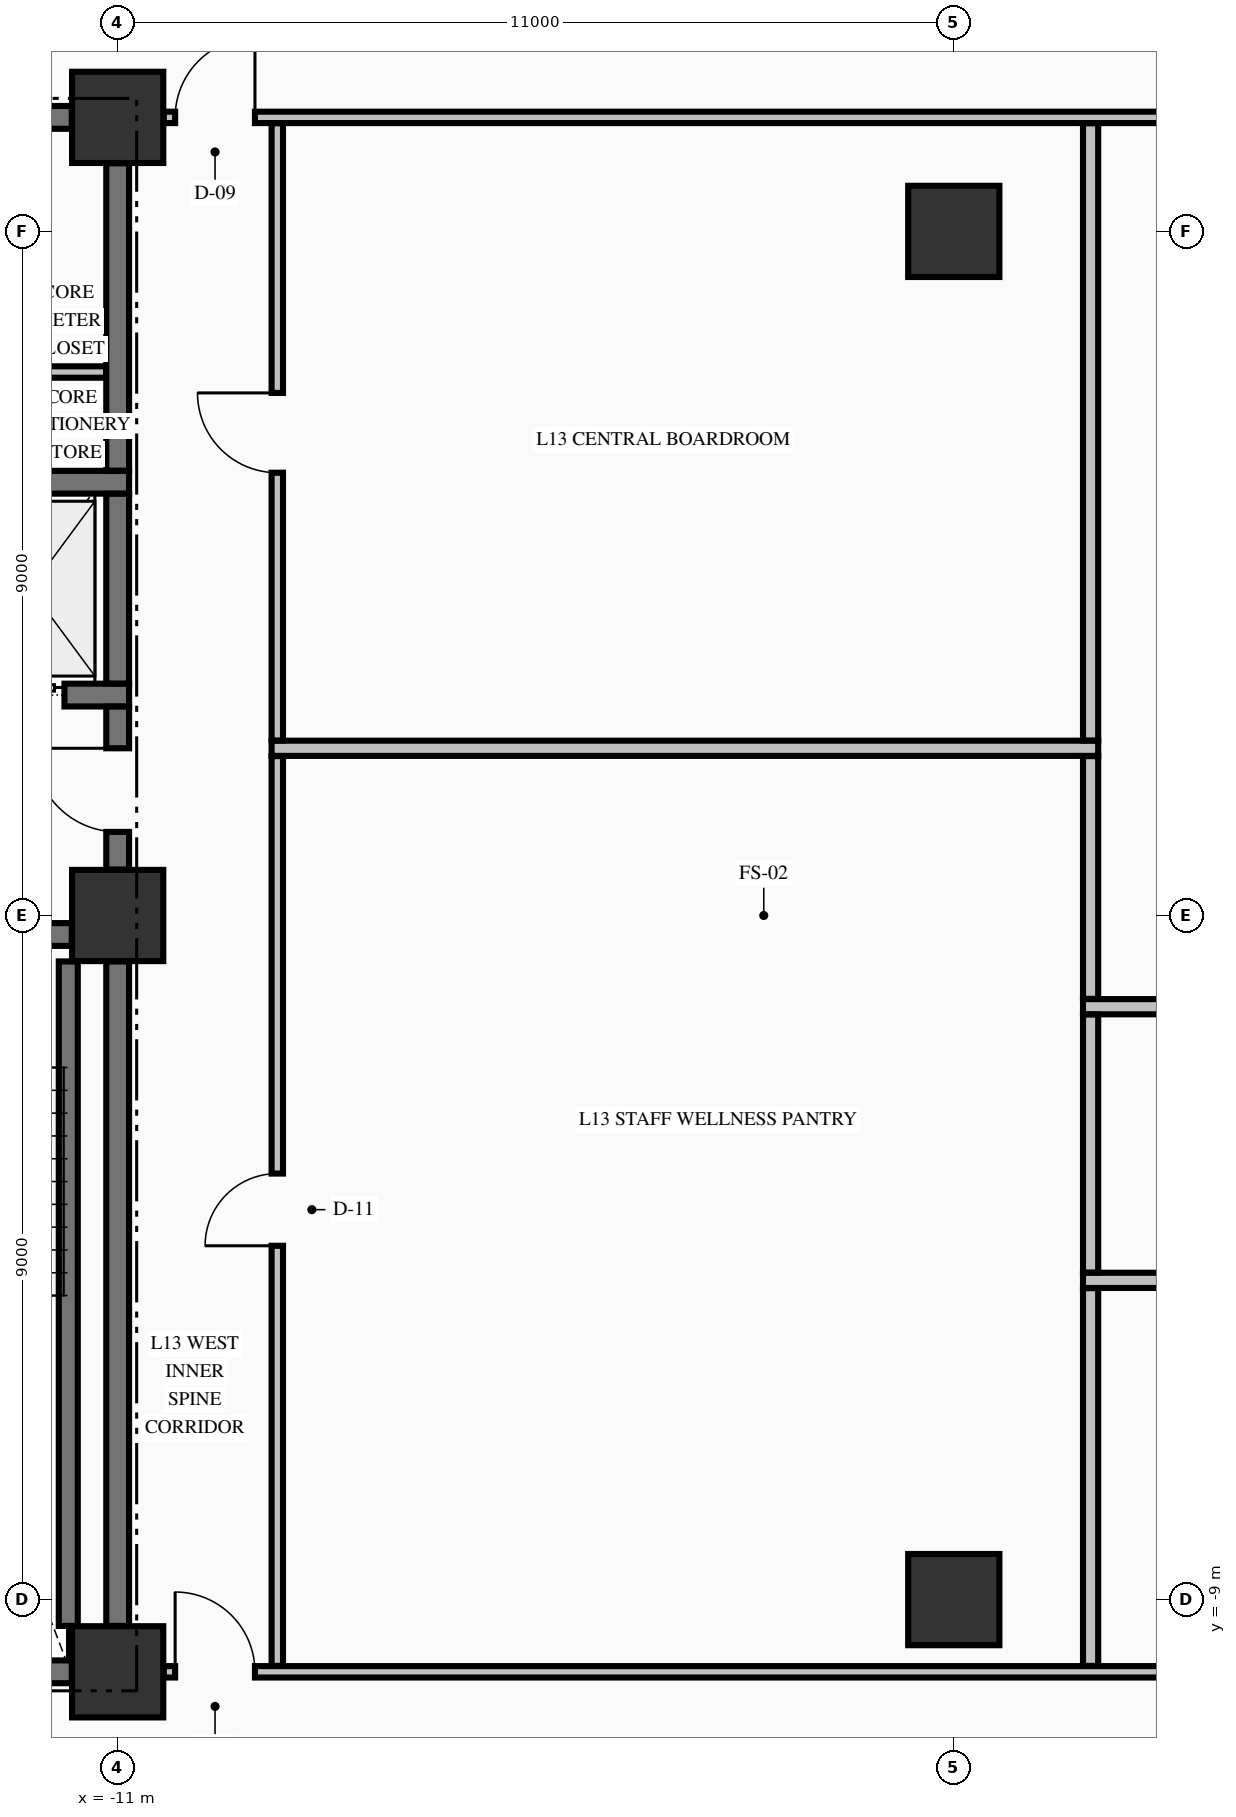
"""IFC4 building model, lengths in metres.
Left out: names, types, materials, properties, quantities, classifications, styles, units other than length and angle.
Written with IfcOpenShell. Run it as: python <this file> out.ifc"""

import sys

from ifc_helpers import new_model, si_unit, direction, frame, frame_2d, origin, origin_2d, place, context, subcontext, project, spatial, rectangle, extrude, element, fill, save


model = new_model("IFC4")
c1 = context("Model", 3, precision=1e-05, world=origin(), true_north=direction((0.0, 1.0)))
c2 = subcontext(c1, "Body", "Model", "MODEL_VIEW")
j1 = project(units=[si_unit("LENGTHUNIT", "METRE"), si_unit("PLANEANGLEUNIT", "RADIAN")], contexts=[c1])
p1 = place(None, origin())
s1 = spatial("IfcSite", under=j1, at=p1, CompositionType="ELEMENT")
p2 = place(p1, origin())
s2 = spatial("IfcBuilding", under=s1, at=p2, CompositionType="ELEMENT")
p3 = place(p2, frame((0.0, 0.0, 57.19)))
s3 = spatial("IfcBuildingStorey", under=s2, at=p3, CompositionType="ELEMENT", Elevation=57.19)
for number, where, z_axis, x_axis in (
    (1, (-11.0, -9.95, -0.425), (0.0, 0.0, 1.0), (1.0, 0.0, 0.0)),
    (2, (-11.0, 0.0, -0.425), (0.0, 0.0, 1.0), (1.0, 0.0, 0.0)),
    (3, (-11.0, 10.5, -0.425), (0.0, 0.0, 1.0), (1.0, 0.0, 0.0)),
    (4, (0.0, -9.0, -0.425), (0.0, 0.0, 1.0), (1.0, 0.0, 0.0)),
    (5, (0.0, 9.0, -0.425), (0.0, 0.0, 1.0), (1.0, 0.0, 0.0)),
):
    element("IfcColumn", number, at=place(p3, frame(where, z_axis=z_axis, x_axis=x_axis)), inside=s3, PredefinedType="COLUMN", context=c2, shape_type="SweptSolid", body=[
        extrude(rectangle(XDim=1.2, YDim=1.2, at=origin_2d()), origin(), (0.0, 0.0, 1.0), 3.695),
    ])
p4 = place(p3, frame((-14.7, -9.95, 0.0), z_axis=(0.0, 0.0, 1.0), x_axis=(1.0, 0.0, 0.0)))
e6 = element("IfcWall", 6, at=p4, inside=s3, PredefinedType="SHEAR", context=c2, shape_type="SweptSolid", body=[
    extrude(rectangle(XDim=3.096, YDim=0.3, at=frame_2d((1.548, 0.0))), origin(), (0.0, 0.0, 1.0), 3.27),
])
p5 = place(p3, frame((-19.396, -0.25, 0.0), z_axis=(0.0, 0.0, 1.0), x_axis=(1.0, 0.0, 0.0)))
e7 = element("IfcWall", 7, at=p5, inside=s3, PredefinedType="SHEAR", context=c2, shape_type="SweptSolid", body=[
    extrude(rectangle(XDim=7.792, YDim=0.3, at=frame_2d((3.896, 0.0))), origin(), (0.0, 0.0, 1.0), 3.27),
])
p6 = place(p5, frame((5.696, 0.0, 0.0)))
e8 = element("IfcOpeningElement", 8, at=p6, cuts=e7, PredefinedType="OPENING", context=c2, shape_type="SweptSolid", body=[
    extrude(rectangle(XDim=1.1, YDim=2.15, at=frame_2d((0.55, 1.075))), frame((0.0, 0.16, 0.0), z_axis=(0.0, -1.0, 0.0), x_axis=(1.0, 0.0, 0.0)), (0.0, 0.0, 1.0), 0.32),
])
p7 = place(p3, frame((-14.875, 2.9, 0.0), z_axis=(0.0, 0.0, 1.0), x_axis=(1.0, 0.0, 0.0)))
e9 = element("IfcWall", 9, at=p7, inside=s3, PredefinedType="SHEAR", context=c2, shape_type="SweptSolid", body=[
    extrude(rectangle(XDim=4.025, YDim=0.3, at=frame_2d((2.012, 0.0))), origin(), (0.0, 0.0, 1.0), 3.27),
])
p8 = place(p7, frame((2.075, 0.0, 0.0)))
e10 = element("IfcOpeningElement", 10, at=p8, cuts=e9, PredefinedType="OPENING", context=c2, shape_type="SweptSolid", body=[
    extrude(rectangle(XDim=1.1, YDim=2.2, at=frame_2d((0.55, 1.1))), frame((0.0, 0.16, 0.0), z_axis=(0.0, -1.0, 0.0), x_axis=(1.0, 0.0, 0.0)), (0.0, 0.0, 1.0), 0.32),
])
p9 = place(p3, frame((-14.875, 5.7, 0.0), z_axis=(0.0, 0.0, 1.0), x_axis=(1.0, 0.0, 0.0)))
e11 = element("IfcWall", 11, at=p9, inside=s3, PredefinedType="SHEAR", context=c2, shape_type="SweptSolid", body=[
    extrude(rectangle(XDim=4.025, YDim=0.3, at=frame_2d((2.012, 0.0))), origin(), (0.0, 0.0, 1.0), 3.27),
])
p10 = place(p3, frame((-14.7, 10.5, 0.0), z_axis=(0.0, 0.0, 1.0), x_axis=(1.0, 0.0, 0.0)))
e12 = element("IfcWall", 12, at=p10, inside=s3, PredefinedType="SHEAR", context=c2, shape_type="SweptSolid", body=[
    extrude(rectangle(XDim=3.096, YDim=0.3, at=frame_2d((1.548, 0.0))), origin(), (0.0, 0.0, 1.0), 3.27),
])
p11 = place(p10, frame((0.305, 0.0, 0.0)))
e13 = element("IfcOpeningElement", 13, at=p11, cuts=e12, PredefinedType="OPENING", context=c2, shape_type="SweptSolid", body=[
    extrude(rectangle(XDim=0.95, YDim=2.15, at=frame_2d((0.475, 1.075))), frame((0.0, 0.16, 0.0), z_axis=(0.0, -1.0, 0.0), x_axis=(1.0, 0.0, 0.0)), (0.0, 0.0, 1.0), 0.32),
])
p12 = place(p3, frame((-10.394, -9.95, 0.0), z_axis=(0.0, 0.0, 1.0), x_axis=(1.0, 0.0, 0.0)))
e14 = element("IfcWall", 14, at=p12, inside=s3, PredefinedType="PARTITIONING", context=c2, shape_type="SweptSolid", body=[
    extrude(rectangle(XDim=20.788, YDim=0.15, at=frame_2d((10.394, 0.0))), origin(), (0.0, 0.0, 1.0), 3.27),
])
p13 = place(p12, frame((0.15, 0.0, 0.0)))
e15 = element("IfcOpeningElement", 15, at=p13, cuts=e14, PredefinedType="OPENING", context=c2, shape_type="SweptSolid", body=[
    extrude(rectangle(XDim=1.05, YDim=2.15, at=frame_2d((0.525, 1.075))), frame((0.0, 0.085, 0.0), z_axis=(0.0, -1.0, 0.0), x_axis=(1.0, 0.0, 0.0)), (0.0, 0.0, 1.0), 0.17),
])
p14 = place(p12, frame((19.588, 0.0, 0.0)))
e16 = element("IfcOpeningElement", 16, at=p14, cuts=e14, PredefinedType="OPENING", context=c2, shape_type="SweptSolid", body=[
    extrude(rectangle(XDim=1.05, YDim=2.15, at=frame_2d((0.525, 1.075))), frame((0.0, 0.085, 0.0), z_axis=(0.0, -1.0, 0.0), x_axis=(1.0, 0.0, 0.0)), (0.0, 0.0, 1.0), 0.17),
])
p15 = place(p12, frame((13.769, 0.0, 0.0)))
e17 = element("IfcOpeningElement", 17, at=p15, cuts=e14, PredefinedType="OPENING", context=c2, shape_type="SweptSolid", body=[
    extrude(rectangle(XDim=0.95, YDim=2.15, at=frame_2d((0.475, 1.075))), frame((0.0, 0.085, 0.0), z_axis=(0.0, -1.0, 0.0), x_axis=(1.0, 0.0, 0.0)), (0.0, 0.0, 1.0), 0.17),
])
for number, where, z_axis, x_axis in (
    (18, (1.7, -4.8, 0.0), (0.0, 0.0, 1.0), (1.0, 0.0, 0.0)),
    (19, (1.7, -1.2, 0.0), (0.0, 0.0, 1.0), (1.0, 0.0, 0.0)),
):
    element("IfcWall", number, at=place(p3, frame(where, z_axis=z_axis, x_axis=x_axis)), inside=s3, PredefinedType="PARTITIONING", context=c2, shape_type="SweptSolid", body=[
        extrude(rectangle(XDim=7.275, YDim=0.2, at=frame_2d((3.638, 0.0))), origin(), (0.0, 0.0, 1.0), 3.27),
    ])
p16 = place(p3, frame((-8.975, 2.2, 0.0), z_axis=(0.0, 0.0, 1.0), x_axis=(1.0, 0.0, 0.0)))
e20 = element("IfcWall", 20, at=p16, inside=s3, PredefinedType="PARTITIONING", context=c2, shape_type="SweptSolid", body=[
    extrude(rectangle(XDim=10.875, YDim=0.2, at=frame_2d((5.438, 0.0))), origin(), (0.0, 0.0, 1.0), 3.27),
])
p17 = place(p3, frame((-13.225, 7.15, 0.0), z_axis=(0.0, 0.0, 1.0), x_axis=(1.0, 0.0, 0.0)))
e21 = element("IfcWall", 21, at=p17, inside=s3, PredefinedType="PARTITIONING", context=c2, shape_type="SweptSolid", body=[
    extrude(rectangle(XDim=2.072, YDim=0.15, at=frame_2d((1.036, 0.0))), origin(), (0.0, 0.0, 1.0), 3.27),
])
p18 = place(p3, frame((-10.394, 10.5, 0.0), z_axis=(0.0, 0.0, 1.0), x_axis=(1.0, 0.0, 0.0)))
e22 = element("IfcWall", 22, at=p18, inside=s3, PredefinedType="PARTITIONING", context=c2, shape_type="SweptSolid", body=[
    extrude(rectangle(XDim=20.788, YDim=0.15, at=frame_2d((10.394, 0.0))), origin(), (0.0, 0.0, 1.0), 3.27),
])
p19 = place(p18, frame((0.15, 0.0, 0.0)))
e23 = element("IfcOpeningElement", 23, at=p19, cuts=e22, PredefinedType="OPENING", context=c2, shape_type="SweptSolid", body=[
    extrude(rectangle(XDim=1.05, YDim=2.15, at=frame_2d((0.525, 1.075))), frame((0.0, 0.085, 0.0), z_axis=(0.0, -1.0, 0.0), x_axis=(1.0, 0.0, 0.0)), (0.0, 0.0, 1.0), 0.17),
])
p20 = place(p18, frame((19.588, 0.0, 0.0)))
e24 = element("IfcOpeningElement", 24, at=p20, cuts=e22, PredefinedType="OPENING", context=c2, shape_type="SweptSolid", body=[
    extrude(rectangle(XDim=1.05, YDim=2.15, at=frame_2d((0.525, 1.075))), frame((0.0, 0.085, 0.0), z_axis=(0.0, -1.0, 0.0), x_axis=(1.0, 0.0, 0.0)), (0.0, 0.0, 1.0), 0.17),
])
p21 = place(p3, frame((-11.65, -9.346, 0.0), z_axis=(0.0, 0.0, 1.0), x_axis=(0.0, 1.0, 0.0)))
e25 = element("IfcWall", 25, at=p21, inside=s3, PredefinedType="SOLIDWALL", context=c2, shape_type="SweptSolid", body=[
    extrude(rectangle(XDim=8.742, YDim=0.25, at=frame_2d((4.371, 0.0))), origin(), (0.0, 0.0, 1.0), 3.27),
])
p22 = place(p3, frame((-11.0, -9.346, 0.0), z_axis=(0.0, 0.0, 1.0), x_axis=(0.0, 1.0, 0.0)))
e26 = element("IfcWall", 26, at=p22, inside=s3, PredefinedType="SHEAR", context=c2, shape_type="SweptSolid", body=[
    extrude(rectangle(XDim=8.742, YDim=0.3, at=frame_2d((4.371, 0.0))), origin(), (0.0, 0.0, 1.0), 3.27),
])
p23 = place(p3, frame((-11.0, 0.604, 0.0), z_axis=(0.0, 0.0, 1.0), x_axis=(0.0, 1.0, 0.0)))
e27 = element("IfcWall", 27, at=p23, inside=s3, PredefinedType="SHEAR", context=c2, shape_type="SweptSolid", body=[
    extrude(rectangle(XDim=2.144, YDim=0.3, at=frame_2d((1.072, 0.0))), origin(), (0.0, 0.0, 1.0), 3.27),
])
p24 = place(p23, frame((0.496, 0.0, 0.0)))
e28 = element("IfcOpeningElement", 28, at=p24, cuts=e27, PredefinedType="OPENING", context=c2, shape_type="SweptSolid", body=[
    extrude(rectangle(XDim=1.1, YDim=2.15, at=frame_2d((0.55, 1.075))), frame((0.0, 0.16, 0.0), z_axis=(0.0, -1.0, 0.0), x_axis=(1.0, 0.0, 0.0)), (0.0, 0.0, 1.0), 0.32),
])
p25 = place(p3, frame((-11.0, 3.052, 0.0), z_axis=(0.0, 0.0, 1.0), x_axis=(0.0, 1.0, 0.0)))
e29 = element("IfcWall", 29, at=p25, inside=s3, PredefinedType="SHEAR", context=c2, shape_type="SweptSolid", body=[
    extrude(rectangle(XDim=2.496, YDim=0.3, at=frame_2d((1.248, 0.0))), origin(), (0.0, 0.0, 1.0), 3.27),
])
p26 = place(p3, frame((-11.0, 5.852, 0.0), z_axis=(0.0, 0.0, 1.0), x_axis=(0.0, 1.0, 0.0)))
e30 = element("IfcWall", 30, at=p26, inside=s3, PredefinedType="SHEAR", context=c2, shape_type="SweptSolid", body=[
    extrude(rectangle(XDim=4.044, YDim=0.3, at=frame_2d((2.022, 0.0))), origin(), (0.0, 0.0, 1.0), 3.27),
])
p27 = place(p3, frame((-8.9, -9.872, 0.0), z_axis=(0.0, 0.0, 1.0), x_axis=(0.0, 1.0, 0.0)))
e31 = element("IfcWall", 31, at=p27, inside=s3, PredefinedType="PARTITIONING", context=c2, shape_type="SweptSolid", body=[
    extrude(rectangle(XDim=11.969, YDim=0.15, at=frame_2d((5.984, 0.0))), origin(), (0.0, 0.0, 1.0), 3.27),
])
p28 = place(p27, frame((5.527, 0.0, 0.0)))
e32 = element("IfcOpeningElement", 32, at=p28, cuts=e31, PredefinedType="OPENING", context=c2, shape_type="SweptSolid", body=[
    extrude(rectangle(XDim=0.95, YDim=2.15, at=frame_2d((0.475, 1.075))), frame((0.0, 0.085, 0.0), z_axis=(0.0, -1.0, 0.0), x_axis=(1.0, 0.0, 0.0)), (0.0, 0.0, 1.0), 0.17),
])
p29 = place(p3, frame((-8.9, 2.303, 0.0), z_axis=(0.0, 0.0, 1.0), x_axis=(0.0, 1.0, 0.0)))
e33 = element("IfcWall", 33, at=p29, inside=s3, PredefinedType="PARTITIONING", context=c2, shape_type="SweptSolid", body=[
    extrude(rectangle(XDim=8.119, YDim=0.15, at=frame_2d((4.06, 0.0))), origin(), (0.0, 0.0, 1.0), 3.27),
])
p30 = place(p29, frame((3.522, 0.0, 0.0)))
e34 = element("IfcOpeningElement", 34, at=p30, cuts=e33, PredefinedType="OPENING", context=c2, shape_type="SweptSolid", body=[
    extrude(rectangle(XDim=1.05, YDim=2.15, at=frame_2d((0.525, 1.075))), frame((0.0, 0.085, 0.0), z_axis=(0.0, -1.0, 0.0), x_axis=(1.0, 0.0, 0.0)), (0.0, 0.0, 1.0), 0.17),
])
p31 = place(p3, frame((1.8, -9.872, 0.0), z_axis=(0.0, 0.0, 1.0), x_axis=(0.0, 1.0, 0.0)))
e35 = element("IfcWall", 35, at=p31, inside=s3, PredefinedType="PARTITIONING", context=c2, shape_type="SweptSolid", body=[
    extrude(rectangle(XDim=4.969, YDim=0.2, at=frame_2d((2.484, 0.0))), origin(), (0.0, 0.0, 1.0), 3.27),
])
p32 = place(p3, frame((1.8, -4.697, 0.0), z_axis=(0.0, 0.0, 1.0), x_axis=(0.0, 1.0, 0.0)))
e36 = element("IfcWall", 36, at=p32, inside=s3, PredefinedType="PARTITIONING", context=c2, shape_type="SweptSolid", body=[
    extrude(rectangle(XDim=3.394, YDim=0.2, at=frame_2d((1.697, 0.0))), origin(), (0.0, 0.0, 1.0), 3.27),
])
p33 = place(p3, frame((1.8, -1.097, 0.0), z_axis=(0.0, 0.0, 1.0), x_axis=(0.0, 1.0, 0.0)))
e37 = element("IfcWall", 37, at=p33, inside=s3, PredefinedType="PARTITIONING", context=c2, shape_type="SweptSolid", body=[
    extrude(rectangle(XDim=3.194, YDim=0.2, at=frame_2d((1.597, 0.0))), origin(), (0.0, 0.0, 1.0), 3.27),
])
p34 = place(p3, frame((1.8, 2.303, 0.0), z_axis=(0.0, 0.0, 1.0), x_axis=(0.0, 1.0, 0.0)))
e38 = element("IfcWall", 38, at=p34, inside=s3, PredefinedType="PARTITIONING", context=c2, shape_type="SweptSolid", body=[
    extrude(rectangle(XDim=8.119, YDim=0.2, at=frame_2d((4.06, 0.0))), origin(), (0.0, 0.0, 1.0), 3.27),
])
p35 = place(p24, origin())
e39 = element("IfcDoor", 39, at=p35, inside=s3, OperationType="SINGLE_SWING_RIGHT", PredefinedType="DOOR", context=c2, shape_type="SweptSolid", body=[
    extrude(rectangle(XDim=1.1, YDim=2.15, at=frame_2d((0.55, 1.075))), frame((0.0, 0.025, 0.0), z_axis=(0.0, -1.0, 0.0), x_axis=(1.0, 0.0, 0.0)), (0.0, 0.0, 1.0), 0.05),
])
fill(e28, e39)
p36 = place(p8, origin())
e40 = element("IfcDoor", 40, at=p36, inside=s3, OperationType="SLIDING_TO_LEFT", PredefinedType="DOOR", context=c2, shape_type="SweptSolid", body=[
    extrude(rectangle(XDim=1.1, YDim=2.2, at=frame_2d((0.55, 1.1))), frame((0.0, 0.025, 0.0), z_axis=(0.0, -1.0, 0.0), x_axis=(1.0, 0.0, 0.0)), (0.0, 0.0, 1.0), 0.05),
])
fill(e10, e40)
p37 = place(p19, origin())
e41 = element("IfcDoor", 41, at=p37, inside=s3, OperationType="SINGLE_SWING_RIGHT", PredefinedType="DOOR", context=c2, shape_type="SweptSolid", body=[
    extrude(rectangle(XDim=1.05, YDim=2.15, at=frame_2d((0.525, 1.075))), frame((0.0, 0.025, 0.0), z_axis=(0.0, -1.0, 0.0), x_axis=(1.0, 0.0, 0.0)), (0.0, 0.0, 1.0), 0.05),
])
fill(e23, e41)
p38 = place(p13, origin())
e42 = element("IfcDoor", 42, at=p38, inside=s3, OperationType="SINGLE_SWING_LEFT", PredefinedType="DOOR", context=c2, shape_type="SweptSolid", body=[
    extrude(rectangle(XDim=1.05, YDim=2.15, at=frame_2d((0.525, 1.075))), frame((0.0, 0.025, 0.0), z_axis=(0.0, -1.0, 0.0), x_axis=(1.0, 0.0, 0.0)), (0.0, 0.0, 1.0), 0.05),
])
fill(e15, e42)
p39 = place(p30, origin())
e43 = element("IfcDoor", 43, at=p39, inside=s3, OperationType="SINGLE_SWING_RIGHT", PredefinedType="DOOR", context=c2, shape_type="SweptSolid", body=[
    extrude(rectangle(XDim=1.05, YDim=2.15, at=frame_2d((0.525, 1.075))), frame((0.0, 0.025, 0.0), z_axis=(0.0, -1.0, 0.0), x_axis=(1.0, 0.0, 0.0)), (0.0, 0.0, 1.0), 0.05),
])
fill(e34, e43)
p40 = place(p28, origin())
e44 = element("IfcDoor", 44, at=p40, inside=s3, OperationType="SINGLE_SWING_LEFT", PredefinedType="DOOR", context=c2, shape_type="SweptSolid", body=[
    extrude(rectangle(XDim=0.95, YDim=2.15, at=frame_2d((0.475, 1.075))), frame((0.0, 0.025, 0.0), z_axis=(0.0, -1.0, 0.0), x_axis=(1.0, 0.0, 0.0)), (0.0, 0.0, 1.0), 0.05),
])
fill(e32, e44)
save(model, sys.argv[1])
